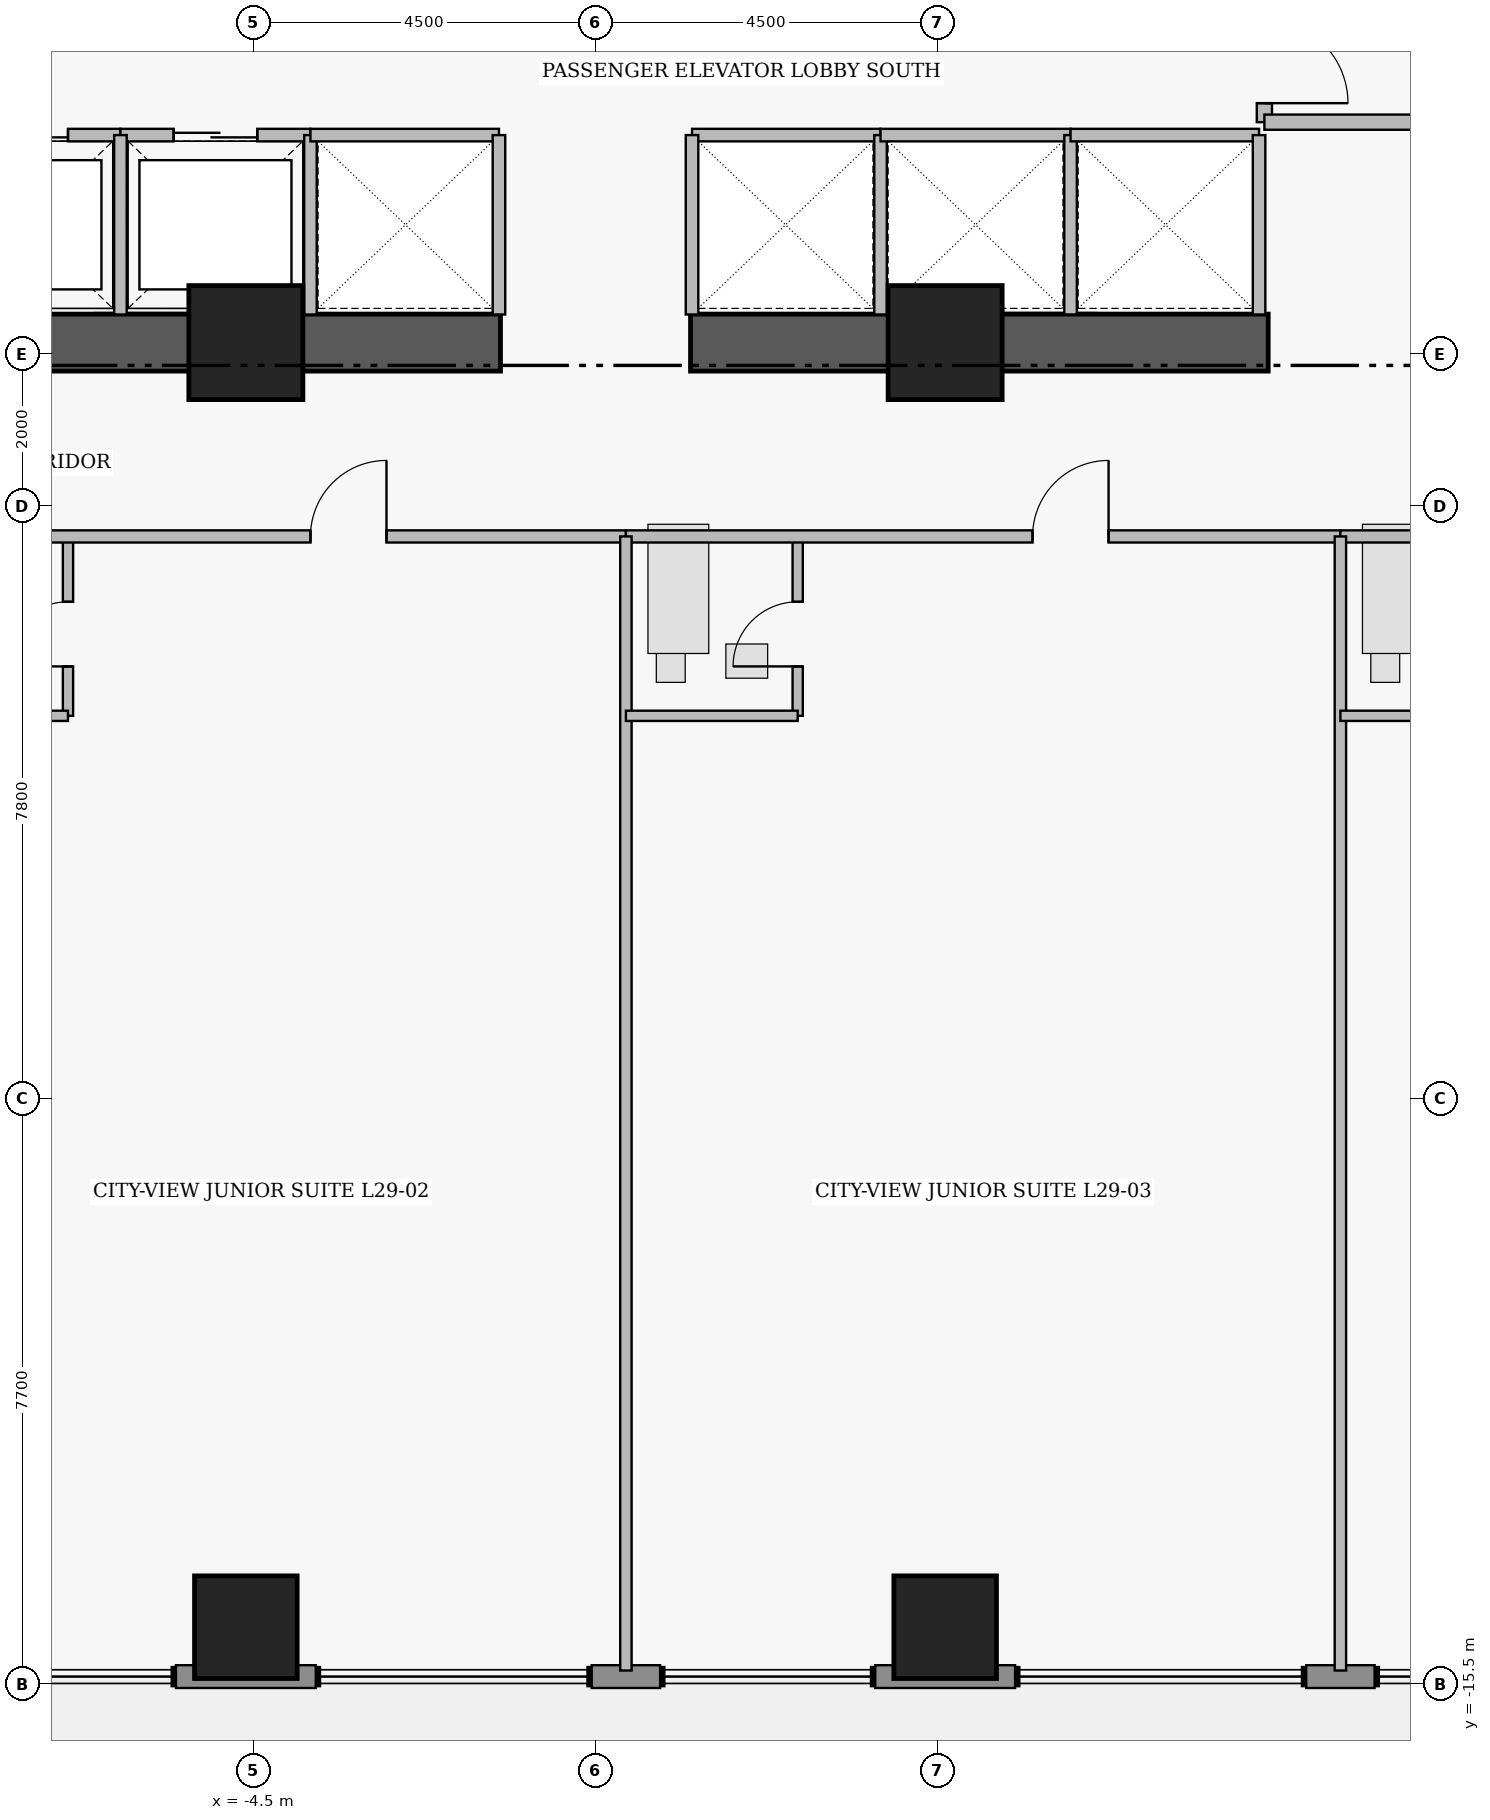
"""IFC4 building model, lengths in metres.
Left out: names, types, materials, properties, quantities, classifications, styles, units other than length and angle.
Written with IfcOpenShell. Run it as: python <this file> out.ifc"""

import sys

from ifc_helpers import new_model, si_unit, direction, frame, frame_2d, origin, origin_2d, place, context, subcontext, project, spatial, rectangle, extrude, element, fill, save


model = new_model("IFC4")
c1 = context("Model", 3, precision=1e-05, world=origin(), true_north=direction((0.0, 1.0)))
c2 = subcontext(c1, "Body", "Model", "MODEL_VIEW")
j1 = project(units=[si_unit("LENGTHUNIT", "METRE"), si_unit("PLANEANGLEUNIT", "RADIAN")], contexts=[c1])
p1 = place(None, origin())
s1 = spatial("IfcSite", under=j1, at=p1, CompositionType="ELEMENT")
p2 = place(p1, origin())
s2 = spatial("IfcBuilding", under=s1, at=p2, CompositionType="ELEMENT")
p3 = place(p2, frame((0.0, 0.0, 117.55)))
s3 = spatial("IfcBuildingStorey", under=s2, at=p3, CompositionType="ELEMENT", Elevation=117.55)
for number, where, z_axis, x_axis in (
    (1, (-8.85, 2.15, 0.0), (0.0, 0.0, 1.0), (1.0, 0.0, 0.0)),
    (2, (1.25, 2.15, 0.0), (0.0, 0.0, 1.0), (1.0, 0.0, 0.0)),
):
    element("IfcWall", number, at=place(p3, frame(where, z_axis=z_axis, x_axis=x_axis)), inside=s3, PredefinedType="SHEAR", context=c2, shape_type="SweptSolid", body=[
        extrude(rectangle(XDim=7.6, YDim=0.75, at=frame_2d((3.8, 0.0))), origin(), (0.0, 0.0, 1.0), 3.43),
    ])
for number, where, z_axis, x_axis in (
    (3, (-4.6, 2.15, 0.0), (0.0, 0.0, 1.0), (1.0, 0.0, 0.0)),
    (4, (4.6, 2.15, 0.0), (0.0, 0.0, 1.0), (1.0, 0.0, 0.0)),
):
    element("IfcColumn", number, at=place(p3, frame(where, z_axis=z_axis, x_axis=x_axis)), inside=s3, PredefinedType="COLUMN", context=c2, shape_type="SweptSolid", body=[
        extrude(rectangle(XDim=1.5, YDim=1.5, at=origin_2d()), origin(), (0.0, 0.0, 1.0), 3.65),
    ])
for number, where, z_axis, x_axis in (
    (5, (-4.6, -14.75, 0.0), (0.0, 0.0, 1.0), (1.0, 0.0, 0.0)),
    (6, (4.6, -14.75, 0.0), (0.0, 0.0, 1.0), (1.0, 0.0, 0.0)),
):
    element("IfcColumn", number, at=place(p3, frame(where, z_axis=z_axis, x_axis=x_axis)), inside=s3, PredefinedType="COLUMN", context=c2, shape_type="SweptSolid", body=[
        extrude(rectangle(XDim=1.35, YDim=1.35, at=origin_2d()), origin(), (0.0, 0.0, 1.0), 3.65),
    ])
p4 = place(p3, frame((10.25, -15.4, 0.0), z_axis=(0.0, 0.0, 1.0), x_axis=(-1.0, 0.0, 0.0)))
e7 = element("IfcWall", 7, at=p4, inside=s3, PredefinedType="STANDARD", context=c2, shape_type="SweptSolid", body=[
    extrude(rectangle(XDim=0.9, YDim=0.3, at=frame_2d((0.45, 0.0))), origin(), (0.0, 0.0, 1.0), 3.43),
])
p5 = place(p3, frame((5.52, -15.4, 0.0), z_axis=(0.0, 0.0, 1.0), x_axis=(-1.0, 0.0, 0.0)))
e8 = element("IfcWall", 8, at=p5, inside=s3, PredefinedType="STANDARD", context=c2, shape_type="SweptSolid", body=[
    extrude(rectangle(XDim=1.84, YDim=0.3, at=frame_2d((0.92, 0.0))), origin(), (0.0, 0.0, 1.0), 3.43),
])
p6 = place(p3, frame((0.85, -15.4, 0.0), z_axis=(0.0, 0.0, 1.0), x_axis=(-1.0, 0.0, 0.0)))
e9 = element("IfcWall", 9, at=p6, inside=s3, PredefinedType="STANDARD", context=c2, shape_type="SweptSolid", body=[
    extrude(rectangle(XDim=0.9, YDim=0.3, at=frame_2d((0.45, 0.0))), origin(), (0.0, 0.0, 1.0), 3.43),
])
p7 = place(p3, frame((-3.68, -15.4, 0.0), z_axis=(0.0, 0.0, 1.0), x_axis=(-1.0, 0.0, 0.0)))
e10 = element("IfcWall", 10, at=p7, inside=s3, PredefinedType="STANDARD", context=c2, shape_type="SweptSolid", body=[
    extrude(rectangle(XDim=1.84, YDim=0.3, at=frame_2d((0.92, 0.0))), origin(), (0.0, 0.0, 1.0), 3.43),
])
p8 = place(p3, frame((8.8, 11.15, 0.0), z_axis=(0.0, 0.0, 1.0), x_axis=(0.0, -1.0, 0.0)))
e11 = element("IfcWall", 11, at=p8, inside=s3, PredefinedType="PARTITIONING", context=c2, shape_type="SweptSolid", body=[
    extrude(rectangle(XDim=6.1, YDim=0.2, at=frame_2d((3.05, 0.0))), origin(), (0.0, 0.0, 1.0), 3.43),
])
p9 = place(p8, frame((1.15, 0.0, 0.0)))
e12 = element("IfcOpeningElement", 12, at=p9, cuts=e11, PredefinedType="OPENING", context=c2, shape_type="SweptSolid", body=[
    extrude(rectangle(XDim=1.1, YDim=2.2, at=frame_2d((0.55, 1.1))), frame((0.0, 0.11, 0.0), z_axis=(0.0, -1.0, 0.0), x_axis=(1.0, 0.0, 0.0)), (0.0, 0.0, 1.0), 0.22),
])
p10 = place(p8, frame((4.75, 0.0, 0.0)))
e13 = element("IfcOpeningElement", 13, at=p10, cuts=e11, PredefinedType="OPENING", context=c2, shape_type="SweptSolid", body=[
    extrude(rectangle(XDim=1.1, YDim=2.2, at=frame_2d((0.55, 1.1))), frame((0.0, 0.11, 0.0), z_axis=(0.0, -1.0, 0.0), x_axis=(1.0, 0.0, 0.0)), (0.0, 0.0, 1.0), 0.22),
])
p11 = place(p3, frame((-8.73, 4.88, 0.0), z_axis=(0.0, 0.0, 1.0), x_axis=(1.0, 0.0, 0.0)))
e14 = element("IfcWall", 14, at=p11, inside=s3, PredefinedType="PARTITIONING", context=c2, shape_type="SweptSolid", body=[
    extrude(rectangle(XDim=2.48, YDim=0.165, at=frame_2d((1.24, 0.0))), origin(), (0.0, 0.0, 1.0), 3.43),
])
p12 = place(p11, frame((0.69, 0.0, 0.0)))
e15 = element("IfcOpeningElement", 15, at=p12, cuts=e14, PredefinedType="OPENING", context=c2, shape_type="SweptSolid", body=[
    extrude(rectangle(XDim=1.1, YDim=2.25, at=frame_2d((0.55, 1.125))), frame((0.0, 0.093, 0.0), z_axis=(0.0, -1.0, 0.0), x_axis=(1.0, 0.0, 0.0)), (0.0, 0.0, 1.0), 0.185),
])
p13 = place(p3, frame((-6.25, 4.88, 0.0), z_axis=(0.0, 0.0, 1.0), x_axis=(1.0, 0.0, 0.0)))
e16 = element("IfcWall", 16, at=p13, inside=s3, PredefinedType="PARTITIONING", context=c2, shape_type="SweptSolid", body=[
    extrude(rectangle(XDim=2.5, YDim=0.165, at=frame_2d((1.25, 0.0))), origin(), (0.0, 0.0, 1.0), 3.43),
])
p14 = place(p13, frame((0.7, 0.0, 0.0)))
e17 = element("IfcOpeningElement", 17, at=p14, cuts=e16, PredefinedType="OPENING", context=c2, shape_type="SweptSolid", body=[
    extrude(rectangle(XDim=1.1, YDim=2.25, at=frame_2d((0.55, 1.125))), frame((0.0, 0.093, 0.0), z_axis=(0.0, -1.0, 0.0), x_axis=(1.0, 0.0, 0.0)), (0.0, 0.0, 1.0), 0.185),
])
p15 = place(p3, frame((-6.94, -2.76, 0.0), z_axis=(0.0, 0.0, 1.0), x_axis=(0.0, 1.0, 0.0)))
e18 = element("IfcWall", 18, at=p15, inside=s3, PredefinedType="PLUMBINGWALL", context=c2, shape_type="SweptSolid", body=[
    extrude(rectangle(XDim=2.36, YDim=0.135, at=frame_2d((1.18, 0.0))), origin(), (0.0, 0.0, 1.0), 3.43),
])
p16 = place(p15, frame((0.65, 0.0, 0.0)))
e19 = element("IfcOpeningElement", 19, at=p16, cuts=e18, PredefinedType="OPENING", context=c2, shape_type="SweptSolid", body=[
    extrude(rectangle(XDim=0.85, YDim=2.1, at=frame_2d((0.425, 1.05))), frame((0.0, 0.077, 0.0), z_axis=(0.0, -1.0, 0.0), x_axis=(1.0, 0.0, 0.0)), (0.0, 0.0, 1.0), 0.155),
])
p17 = place(p3, frame((-9.2, -0.4, 0.0), z_axis=(0.0, 0.0, 1.0), x_axis=(1.0, 0.0, 0.0)))
e20 = element("IfcWall", 20, at=p17, inside=s3, PredefinedType="PARTITIONING", context=c2, shape_type="SweptSolid", body=[
    extrude(rectangle(XDim=9.6, YDim=0.16, at=frame_2d((4.8, 0.0))), origin(), (0.0, 0.0, 1.0), 3.43),
])
p18 = place(p17, frame((5.45, 0.0, 0.0)))
e21 = element("IfcOpeningElement", 21, at=p18, cuts=e20, PredefinedType="OPENING", context=c2, shape_type="SweptSolid", body=[
    extrude(rectangle(XDim=1.0, YDim=2.15, at=frame_2d((0.5, 1.075))), frame((0.0, 0.09, 0.0), z_axis=(0.0, -1.0, 0.0), x_axis=(1.0, 0.0, 0.0)), (0.0, 0.0, 1.0), 0.18),
])
p19 = place(p3, frame((2.66, -2.76, 0.0), z_axis=(0.0, 0.0, 1.0), x_axis=(0.0, 1.0, 0.0)))
e22 = element("IfcWall", 22, at=p19, inside=s3, PredefinedType="PLUMBINGWALL", context=c2, shape_type="SweptSolid", body=[
    extrude(rectangle(XDim=2.36, YDim=0.135, at=frame_2d((1.18, 0.0))), origin(), (0.0, 0.0, 1.0), 3.43),
])
p20 = place(p19, frame((0.65, 0.0, 0.0)))
e23 = element("IfcOpeningElement", 23, at=p20, cuts=e22, PredefinedType="OPENING", context=c2, shape_type="SweptSolid", body=[
    extrude(rectangle(XDim=0.85, YDim=2.1, at=frame_2d((0.425, 1.05))), frame((0.0, 0.077, 0.0), z_axis=(0.0, -1.0, 0.0), x_axis=(1.0, 0.0, 0.0)), (0.0, 0.0, 1.0), 0.155),
])
p21 = place(p3, frame((0.4, -0.4, 0.0), z_axis=(0.0, 0.0, 1.0), x_axis=(1.0, 0.0, 0.0)))
e24 = element("IfcWall", 24, at=p21, inside=s3, PredefinedType="PARTITIONING", context=c2, shape_type="SweptSolid", body=[
    extrude(rectangle(XDim=9.4, YDim=0.16, at=frame_2d((4.7, 0.0))), origin(), (0.0, 0.0, 1.0), 3.43),
])
p22 = place(p21, frame((5.35, 0.0, 0.0)))
e25 = element("IfcOpeningElement", 25, at=p22, cuts=e24, PredefinedType="OPENING", context=c2, shape_type="SweptSolid", body=[
    extrude(rectangle(XDim=1.0, YDim=2.15, at=frame_2d((0.5, 1.075))), frame((0.0, 0.09, 0.0), z_axis=(0.0, -1.0, 0.0), x_axis=(1.0, 0.0, 0.0)), (0.0, 0.0, 1.0), 0.18),
])
p23 = place(p3, frame((9.8, -0.4, 0.0), z_axis=(0.0, 0.0, 1.0), x_axis=(1.0, 0.0, 0.0)))
e26 = element("IfcWall", 26, at=p23, inside=s3, PredefinedType="PARTITIONING", context=c2, shape_type="SweptSolid", body=[
    extrude(rectangle(XDim=10.8, YDim=0.16, at=frame_2d((5.4, 0.0))), origin(), (0.0, 0.0, 1.0), 3.43),
])
p24 = place(p23, frame((5.925, 0.0, 0.0)))
e27 = element("IfcOpeningElement", 27, at=p24, cuts=e26, PredefinedType="OPENING", context=c2, shape_type="SweptSolid", body=[
    extrude(rectangle(XDim=1.0, YDim=2.15, at=frame_2d((0.5, 1.075))), frame((0.0, 0.09, 0.0), z_axis=(0.0, -1.0, 0.0), x_axis=(1.0, 0.0, 0.0)), (0.0, 0.0, 1.0), 0.18),
])
p25 = place(p3, frame((8.8, 5.05, 0.0), z_axis=(0.0, 0.0, 1.0), x_axis=(1.0, 0.0, 0.0)))
e28 = element("IfcWall", 28, at=p25, inside=s3, PredefinedType="PARTITIONING", context=c2, shape_type="SweptSolid", body=[
    extrude(rectangle(XDim=2.85, YDim=0.2, at=frame_2d((1.425, 0.0))), origin(), (0.0, 0.0, 1.0), 3.43),
])
for number, where, z_axis, x_axis in (
    (29, (-6.25, 2.52, 0.0), (0.0, 0.0, 1.0), (0.0, 1.0, 0.0)),
    (30, (-3.75, 2.52, 0.0), (0.0, 0.0, 1.0), (0.0, 1.0, 0.0)),
):
    element("IfcWall", number, at=place(p3, frame(where, z_axis=z_axis, x_axis=x_axis)), inside=s3, PredefinedType="PARTITIONING", context=c2, shape_type="SweptSolid", body=[
        extrude(rectangle(XDim=2.36, YDim=0.165, at=frame_2d((1.18, 0.0))), origin(), (0.0, 0.0, 1.0), 3.43),
    ])
p26 = place(p3, frame((-3.75, 4.88, 0.0), z_axis=(0.0, 0.0, 1.0), x_axis=(1.0, 0.0, 0.0)))
e31 = element("IfcWall", 31, at=p26, inside=s3, PredefinedType="PARTITIONING", context=c2, shape_type="SweptSolid", body=[
    extrude(rectangle(XDim=2.48, YDim=0.165, at=frame_2d((1.24, 0.0))), origin(), (0.0, 0.0, 1.0), 3.43),
])
p27 = place(p3, frame((-1.27, 2.52, 0.0), z_axis=(0.0, 0.0, 1.0), x_axis=(0.0, 1.0, 0.0)))
e32 = element("IfcWall", 32, at=p27, inside=s3, PredefinedType="PARTITIONING", context=c2, shape_type="SweptSolid", body=[
    extrude(rectangle(XDim=2.36, YDim=0.165, at=frame_2d((1.18, 0.0))), origin(), (0.0, 0.0, 1.0), 3.43),
])
p28 = place(p3, frame((1.27, 4.88, 0.0), z_axis=(0.0, 0.0, 1.0), x_axis=(1.0, 0.0, 0.0)))
e33 = element("IfcWall", 33, at=p28, inside=s3, PredefinedType="PARTITIONING", context=c2, shape_type="SweptSolid", body=[
    extrude(rectangle(XDim=2.48, YDim=0.165, at=frame_2d((1.24, 0.0))), origin(), (0.0, 0.0, 1.0), 3.43),
])
for number, where, z_axis, x_axis in (
    (34, (1.27, 2.52, 0.0), (0.0, 0.0, 1.0), (0.0, 1.0, 0.0)),
    (35, (3.75, 2.52, 0.0), (0.0, 0.0, 1.0), (0.0, 1.0, 0.0)),
):
    element("IfcWall", number, at=place(p3, frame(where, z_axis=z_axis, x_axis=x_axis)), inside=s3, PredefinedType="PARTITIONING", context=c2, shape_type="SweptSolid", body=[
        extrude(rectangle(XDim=2.36, YDim=0.165, at=frame_2d((1.18, 0.0))), origin(), (0.0, 0.0, 1.0), 3.43),
    ])
p29 = place(p3, frame((3.75, 4.88, 0.0), z_axis=(0.0, 0.0, 1.0), x_axis=(1.0, 0.0, 0.0)))
e36 = element("IfcWall", 36, at=p29, inside=s3, PredefinedType="PARTITIONING", context=c2, shape_type="SweptSolid", body=[
    extrude(rectangle(XDim=2.5, YDim=0.165, at=frame_2d((1.25, 0.0))), origin(), (0.0, 0.0, 1.0), 3.43),
])
p30 = place(p3, frame((6.25, 2.52, 0.0), z_axis=(0.0, 0.0, 1.0), x_axis=(0.0, 1.0, 0.0)))
e37 = element("IfcWall", 37, at=p30, inside=s3, PredefinedType="PARTITIONING", context=c2, shape_type="SweptSolid", body=[
    extrude(rectangle(XDim=2.36, YDim=0.165, at=frame_2d((1.18, 0.0))), origin(), (0.0, 0.0, 1.0), 3.43),
])
p31 = place(p3, frame((6.25, 4.88, 0.0), z_axis=(0.0, 0.0, 1.0), x_axis=(1.0, 0.0, 0.0)))
e38 = element("IfcWall", 38, at=p31, inside=s3, PredefinedType="PARTITIONING", context=c2, shape_type="SweptSolid", body=[
    extrude(rectangle(XDim=2.48, YDim=0.165, at=frame_2d((1.24, 0.0))), origin(), (0.0, 0.0, 1.0), 3.43),
])
p32 = place(p3, frame((8.73, 2.52, 0.0), z_axis=(0.0, 0.0, 1.0), x_axis=(0.0, 1.0, 0.0)))
e39 = element("IfcWall", 39, at=p32, inside=s3, PredefinedType="PARTITIONING", context=c2, shape_type="SweptSolid", body=[
    extrude(rectangle(XDim=2.36, YDim=0.165, at=frame_2d((1.18, 0.0))), origin(), (0.0, 0.0, 1.0), 3.43),
])
p33 = place(p3, frame((-9.2, -2.76, 0.0), z_axis=(0.0, 0.0, 1.0), x_axis=(1.0, 0.0, 0.0)))
e40 = element("IfcWall", 40, at=p33, inside=s3, PredefinedType="PLUMBINGWALL", context=c2, shape_type="SweptSolid", body=[
    extrude(rectangle(XDim=2.26, YDim=0.135, at=frame_2d((1.13, 0.0))), origin(), (0.0, 0.0, 1.0), 3.43),
])
p34 = place(p3, frame((0.4, -15.32, 0.0), z_axis=(0.0, 0.0, 1.0), x_axis=(0.0, 1.0, 0.0)))
e41 = element("IfcWall", 41, at=p34, inside=s3, PredefinedType="PARTITIONING", context=c2, shape_type="SweptSolid", body=[
    extrude(rectangle(XDim=14.92, YDim=0.15, at=frame_2d((7.46, 0.0))), origin(), (0.0, 0.0, 1.0), 3.43),
])
p35 = place(p3, frame((0.4, -2.76, 0.0), z_axis=(0.0, 0.0, 1.0), x_axis=(1.0, 0.0, 0.0)))
e42 = element("IfcWall", 42, at=p35, inside=s3, PredefinedType="PLUMBINGWALL", context=c2, shape_type="SweptSolid", body=[
    extrude(rectangle(XDim=2.26, YDim=0.135, at=frame_2d((1.13, 0.0))), origin(), (0.0, 0.0, 1.0), 3.43),
])
p36 = place(p3, frame((9.8, -15.32, 0.0), z_axis=(0.0, 0.0, 1.0), x_axis=(0.0, 1.0, 0.0)))
e43 = element("IfcWall", 43, at=p36, inside=s3, PredefinedType="PARTITIONING", context=c2, shape_type="SweptSolid", body=[
    extrude(rectangle(XDim=14.92, YDim=0.15, at=frame_2d((7.46, 0.0))), origin(), (0.0, 0.0, 1.0), 3.43),
])
p37 = place(p3, frame((9.8, -2.76, 0.0), z_axis=(0.0, 0.0, 1.0), x_axis=(1.0, 0.0, 0.0)))
e44 = element("IfcWall", 44, at=p37, inside=s3, PredefinedType="PLUMBINGWALL", context=c2, shape_type="SweptSolid", body=[
    extrude(rectangle(XDim=2.26, YDim=0.135, at=frame_2d((1.13, 0.0))), origin(), (0.0, 0.0, 1.0), 3.43),
])
p38 = place(p10, origin())
e45 = element("IfcDoor", 45, at=p38, inside=s3, OperationType="SINGLE_SWING_RIGHT", PredefinedType="DOOR", context=c2, shape_type="SweptSolid", body=[
    extrude(rectangle(XDim=1.1, YDim=2.2, at=frame_2d((0.55, 1.1))), frame((0.0, 0.025, 0.0), z_axis=(0.0, -1.0, 0.0), x_axis=(1.0, 0.0, 0.0)), (0.0, 0.0, 1.0), 0.05),
])
fill(e13, e45)
p39 = place(p12, origin())
e46 = element("IfcDoor", 46, at=p39, inside=s3, OperationType="SLIDING_TO_LEFT", PredefinedType="DOOR", context=c2, shape_type="SweptSolid", body=[
    extrude(rectangle(XDim=1.1, YDim=2.25, at=frame_2d((0.55, 1.125))), frame((0.0, 0.025, 0.0), z_axis=(0.0, -1.0, 0.0), x_axis=(1.0, 0.0, 0.0)), (0.0, 0.0, 1.0), 0.05),
])
fill(e15, e46)
p40 = place(p14, origin())
e47 = element("IfcDoor", 47, at=p40, inside=s3, OperationType="SLIDING_TO_LEFT", PredefinedType="DOOR", context=c2, shape_type="SweptSolid", body=[
    extrude(rectangle(XDim=1.1, YDim=2.25, at=frame_2d((0.55, 1.125))), frame((0.0, 0.025, 0.0), z_axis=(0.0, -1.0, 0.0), x_axis=(1.0, 0.0, 0.0)), (0.0, 0.0, 1.0), 0.05),
])
fill(e17, e47)
p41 = place(p16, origin())
e48 = element("IfcDoor", 48, at=p41, inside=s3, OperationType="SINGLE_SWING_LEFT", PredefinedType="DOOR", context=c2, shape_type="SweptSolid", body=[
    extrude(rectangle(XDim=0.85, YDim=2.1, at=frame_2d((0.425, 1.05))), frame((0.0, 0.025, 0.0), z_axis=(0.0, -1.0, 0.0), x_axis=(1.0, 0.0, 0.0)), (0.0, 0.0, 1.0), 0.05),
])
fill(e19, e48)
p42 = place(p18, origin())
e49 = element("IfcDoor", 49, at=p42, inside=s3, OperationType="SINGLE_SWING_RIGHT", PredefinedType="DOOR", context=c2, shape_type="SweptSolid", body=[
    extrude(rectangle(XDim=1.0, YDim=2.15, at=frame_2d((0.5, 1.075))), frame((0.0, 0.025, 0.0), z_axis=(0.0, -1.0, 0.0), x_axis=(1.0, 0.0, 0.0)), (0.0, 0.0, 1.0), 0.05),
])
fill(e21, e49)
p43 = place(p20, origin())
e50 = element("IfcDoor", 50, at=p43, inside=s3, OperationType="SINGLE_SWING_LEFT", PredefinedType="DOOR", context=c2, shape_type="SweptSolid", body=[
    extrude(rectangle(XDim=0.85, YDim=2.1, at=frame_2d((0.425, 1.05))), frame((0.0, 0.025, 0.0), z_axis=(0.0, -1.0, 0.0), x_axis=(1.0, 0.0, 0.0)), (0.0, 0.0, 1.0), 0.05),
])
fill(e23, e50)
p44 = place(p22, origin())
e51 = element("IfcDoor", 51, at=p44, inside=s3, OperationType="SINGLE_SWING_RIGHT", PredefinedType="DOOR", context=c2, shape_type="SweptSolid", body=[
    extrude(rectangle(XDim=1.0, YDim=2.15, at=frame_2d((0.5, 1.075))), frame((0.0, 0.025, 0.0), z_axis=(0.0, -1.0, 0.0), x_axis=(1.0, 0.0, 0.0)), (0.0, 0.0, 1.0), 0.05),
])
fill(e25, e51)
save(model, sys.argv[1])
